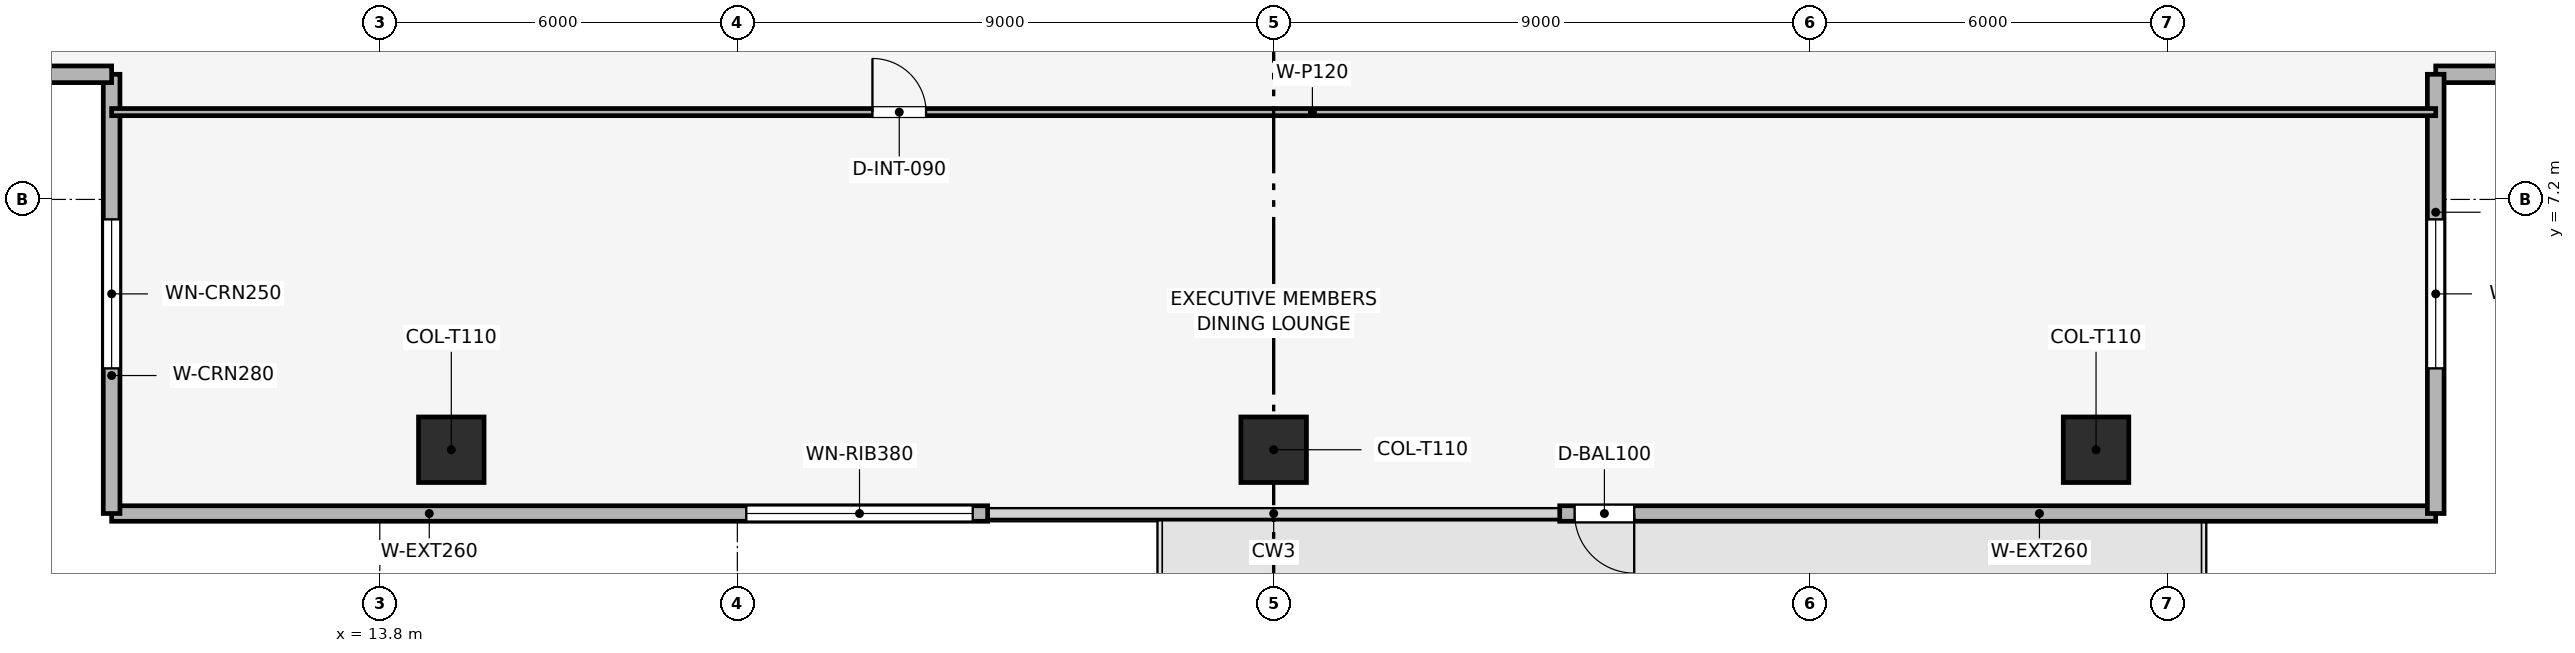
"""IFC4 building model, lengths in metres.
Left out: names, types, materials, properties, quantities, classifications, styles, units other than length and angle.
Written with IfcOpenShell. Run it as: python <this file> out.ifc"""

import sys

from ifc_helpers import new_model, si_unit, direction, frame, frame_2d, origin, origin_2d, place, context, subcontext, project, spatial, rectangle, extrude, element, fill, save


model = new_model("IFC4")
c1 = context("Model", 3, precision=1e-05, world=origin(), true_north=direction((0.0, 1.0)))
c2 = subcontext(c1, "Body", "Model", "MODEL_VIEW")
j1 = project(units=[si_unit("LENGTHUNIT", "METRE"), si_unit("PLANEANGLEUNIT", "RADIAN")], contexts=[c1])
p1 = place(None, origin())
s1 = spatial("IfcSite", under=j1, at=p1, CompositionType="ELEMENT")
p2 = place(p1, origin())
s2 = spatial("IfcBuilding", under=s1, at=p2, CompositionType="ELEMENT")
p3 = place(p2, frame((0.0, 0.0, 222.45)))
s3 = spatial("IfcBuildingStorey", under=s2, at=p3, CompositionType="ELEMENT", Elevation=222.45)
for number, where, z_axis, x_axis in (
    (1, (15.0, 3.0, 0.003), (0.0, 0.0, 1.0), (1.0, 0.0, 0.0)),
    (2, (28.8, 3.0, 0.003), (0.0, 0.0, 1.0), (1.0, 0.0, 0.0)),
    (3, (42.6, 3.0, 0.003), (0.0, 0.0, 1.0), (1.0, 0.0, 0.0)),
):
    element("IfcColumn", number, at=place(p3, frame(where, z_axis=z_axis, x_axis=x_axis)), inside=s3, PredefinedType="COLUMN", context=c2, shape_type="SweptSolid", body=[
        extrude(rectangle(XDim=1.1, YDim=1.1, at=origin_2d()), origin(), (0.0, 0.0, 1.0), 3.494),
    ])
p4 = place(p3, frame((48.3, 1.93, 0.0), z_axis=(0.0, 0.0, 1.0), x_axis=(-1.0, 0.0, 0.0)))
e4 = element("IfcWall", 4, at=p4, inside=s3, PredefinedType="SOLIDWALL", context=c2, shape_type="SweptSolid", body=[
    extrude(rectangle(XDim=14.7, YDim=0.26, at=frame_2d((7.35, 0.0))), origin(), (0.0, 0.0, 1.0), 3.5),
])
p5 = place(p4, frame((13.45, 0.0, 0.0)))
e5 = element("IfcOpeningElement", 5, at=p5, cuts=e4, PredefinedType="OPENING", context=c2, shape_type="SweptSolid", body=[
    extrude(rectangle(XDim=1.0, YDim=2.2, at=frame_2d((0.5, 1.1))), frame((0.0, 0.14, 0.0), z_axis=(0.0, -1.0, 0.0), x_axis=(1.0, 0.0, 0.0)), (0.0, 0.0, 1.0), 0.28),
])
p6 = place(p3, frame((24.0, 1.93, 0.0), z_axis=(0.0, 0.0, 1.0), x_axis=(-1.0, 0.0, 0.0)))
e6 = element("IfcWall", 6, at=p6, inside=s3, PredefinedType="SOLIDWALL", context=c2, shape_type="SweptSolid", body=[
    extrude(rectangle(XDim=14.7, YDim=0.26, at=frame_2d((7.35, 0.0))), origin(), (0.0, 0.0, 1.0), 3.5),
])
p7 = place(p6, frame((0.25, 0.0, 0.9)))
e7 = element("IfcOpeningElement", 7, at=p7, cuts=e6, PredefinedType="OPENING", context=c2, shape_type="SweptSolid", body=[
    extrude(rectangle(XDim=3.8, YDim=1.9, at=frame_2d((1.9, 0.95))), frame((0.0, 0.14, 0.0), z_axis=(0.0, -1.0, 0.0), x_axis=(1.0, 0.0, 0.0)), (0.0, 0.0, 1.0), 0.28),
])
p8 = place(p3, frame((9.3, 1.93, 0.0), z_axis=(0.0, 0.0, 1.0), x_axis=(0.0, 1.0, 0.0)))
e8 = element("IfcWall", 8, at=p8, inside=s3, PredefinedType="SOLIDWALL", context=c2, shape_type="SweptSolid", body=[
    extrude(rectangle(XDim=7.37, YDim=0.28, at=frame_2d((3.685, 0.0))), origin(), (0.0, 0.0, 1.0), 3.5),
])
p9 = place(p8, frame((2.435, 0.0, 0.9)))
e9 = element("IfcOpeningElement", 9, at=p9, cuts=e8, PredefinedType="OPENING", context=c2, shape_type="SweptSolid", body=[
    extrude(rectangle(XDim=2.5, YDim=1.9, at=frame_2d((1.25, 0.95))), frame((0.0, 0.15, 0.0), z_axis=(0.0, -1.0, 0.0), x_axis=(1.0, 0.0, 0.0)), (0.0, 0.0, 1.0), 0.3),
])
p10 = place(p3, frame((9.3, 9.3, 0.0), z_axis=(0.0, 0.0, 1.0), x_axis=(-1.0, 0.0, 0.0)))
e10 = element("IfcWall", 10, at=p10, inside=s3, PredefinedType="SOLIDWALL", context=c2, shape_type="SweptSolid", body=[
    extrude(rectangle(XDim=7.37, YDim=0.28, at=frame_2d((3.685, 0.0))), origin(), (0.0, 0.0, 1.0), 3.5),
])
p11 = place(p10, frame((2.435, 0.0, 0.9)))
e11 = element("IfcOpeningElement", 11, at=p11, cuts=e10, PredefinedType="OPENING", context=c2, shape_type="SweptSolid", body=[
    extrude(rectangle(XDim=2.5, YDim=1.9, at=frame_2d((1.25, 0.95))), frame((0.0, 0.15, 0.0), z_axis=(0.0, -1.0, 0.0), x_axis=(1.0, 0.0, 0.0)), (0.0, 0.0, 1.0), 0.3),
])
p12 = place(p3, frame((55.67, 9.3, 0.0), z_axis=(0.0, 0.0, 1.0), x_axis=(-1.0, 0.0, 0.0)))
e12 = element("IfcWall", 12, at=p12, inside=s3, PredefinedType="SOLIDWALL", context=c2, shape_type="SweptSolid", body=[
    extrude(rectangle(XDim=7.37, YDim=0.28, at=frame_2d((3.685, 0.0))), origin(), (0.0, 0.0, 1.0), 3.5),
])
p13 = place(p12, frame((2.435, 0.0, 0.9)))
e13 = element("IfcOpeningElement", 13, at=p13, cuts=e12, PredefinedType="OPENING", context=c2, shape_type="SweptSolid", body=[
    extrude(rectangle(XDim=2.5, YDim=1.9, at=frame_2d((1.25, 0.95))), frame((0.0, 0.15, 0.0), z_axis=(0.0, -1.0, 0.0), x_axis=(1.0, 0.0, 0.0)), (0.0, 0.0, 1.0), 0.3),
])
p14 = place(p3, frame((48.3, 9.3, 0.0), z_axis=(0.0, 0.0, 1.0), x_axis=(0.0, -1.0, 0.0)))
e14 = element("IfcWall", 14, at=p14, inside=s3, PredefinedType="SOLIDWALL", context=c2, shape_type="SweptSolid", body=[
    extrude(rectangle(XDim=7.37, YDim=0.28, at=frame_2d((3.685, 0.0))), origin(), (0.0, 0.0, 1.0), 3.5),
])
p15 = place(p14, frame((2.435, 0.0, 0.9)))
e15 = element("IfcOpeningElement", 15, at=p15, cuts=e14, PredefinedType="OPENING", context=c2, shape_type="SweptSolid", body=[
    extrude(rectangle(XDim=2.5, YDim=1.9, at=frame_2d((1.25, 0.95))), frame((0.0, 0.15, 0.0), z_axis=(0.0, -1.0, 0.0), x_axis=(1.0, 0.0, 0.0)), (0.0, 0.0, 1.0), 0.3),
])
p16 = place(p3, frame((9.3, 8.665, 0.0), z_axis=(0.0, 0.0, 1.0), x_axis=(1.0, 0.0, 0.0)))
e16 = element("IfcWall", 16, at=p16, inside=s3, PredefinedType="PARTITIONING", context=c2, shape_type="SweptSolid", body=[
    extrude(rectangle(XDim=39.0, YDim=0.12, at=frame_2d((19.5, 0.0))), origin(), (0.0, 0.0, 1.0), 2.885),
])
p17 = place(p16, frame((12.767, 0.0, 0.0)))
e17 = element("IfcOpeningElement", 17, at=p17, cuts=e16, PredefinedType="OPENING", context=c2, shape_type="SweptSolid", body=[
    extrude(rectangle(XDim=0.9, YDim=2.1, at=frame_2d((0.45, 1.05))), frame((0.0, 0.07, 0.0), z_axis=(0.0, -1.0, 0.0), x_axis=(1.0, 0.0, 0.0)), (0.0, 0.0, 1.0), 0.14),
])
p18 = place(p5, origin())
e18 = element("IfcDoor", 18, at=p18, inside=s3, OperationType="SINGLE_SWING_LEFT", PredefinedType="DOOR", context=c2, shape_type="SweptSolid", body=[
    extrude(rectangle(XDim=1.0, YDim=2.2, at=frame_2d((0.5, 1.1))), frame((0.0, 0.025, 0.0), z_axis=(0.0, -1.0, 0.0), x_axis=(1.0, 0.0, 0.0)), (0.0, 0.0, 1.0), 0.05),
])
fill(e5, e18)
p19 = place(p7, origin())
e19 = element("IfcWindow", 19, at=p19, inside=s3, PartitioningType="SINGLE_PANEL", PredefinedType="WINDOW", context=c2, shape_type="SweptSolid", body=[
    extrude(rectangle(XDim=3.8, YDim=1.9, at=frame_2d((1.9, 0.95))), frame((0.0, 0.03, 0.0), z_axis=(0.0, -1.0, 0.0), x_axis=(1.0, 0.0, 0.0)), (0.0, 0.0, 1.0), 0.06),
])
fill(e7, e19)
p20 = place(p9, origin())
e20 = element("IfcWindow", 20, at=p20, inside=s3, PartitioningType="SINGLE_PANEL", PredefinedType="WINDOW", context=c2, shape_type="SweptSolid", body=[
    extrude(rectangle(XDim=2.5, YDim=1.9, at=frame_2d((1.25, 0.95))), frame((0.0, 0.03, 0.0), z_axis=(0.0, -1.0, 0.0), x_axis=(1.0, 0.0, 0.0)), (0.0, 0.0, 1.0), 0.06),
])
fill(e9, e20)
p21 = place(p15, origin())
e21 = element("IfcWindow", 21, at=p21, inside=s3, PartitioningType="SINGLE_PANEL", PredefinedType="WINDOW", context=c2, shape_type="SweptSolid", body=[
    extrude(rectangle(XDim=2.5, YDim=1.9, at=frame_2d((1.25, 0.95))), frame((0.0, 0.03, 0.0), z_axis=(0.0, -1.0, 0.0), x_axis=(1.0, 0.0, 0.0)), (0.0, 0.0, 1.0), 0.06),
])
fill(e15, e21)
p22 = place(p17, origin())
e22 = element("IfcDoor", 22, at=p22, inside=s3, OperationType="SINGLE_SWING_LEFT", PredefinedType="DOOR", context=c2, shape_type="SweptSolid", body=[
    extrude(rectangle(XDim=0.9, YDim=2.1, at=frame_2d((0.45, 1.05))), frame((0.0, 0.025, 0.0), z_axis=(0.0, -1.0, 0.0), x_axis=(1.0, 0.0, 0.0)), (0.0, 0.0, 1.0), 0.05),
])
fill(e17, e22)
save(model, sys.argv[1])
